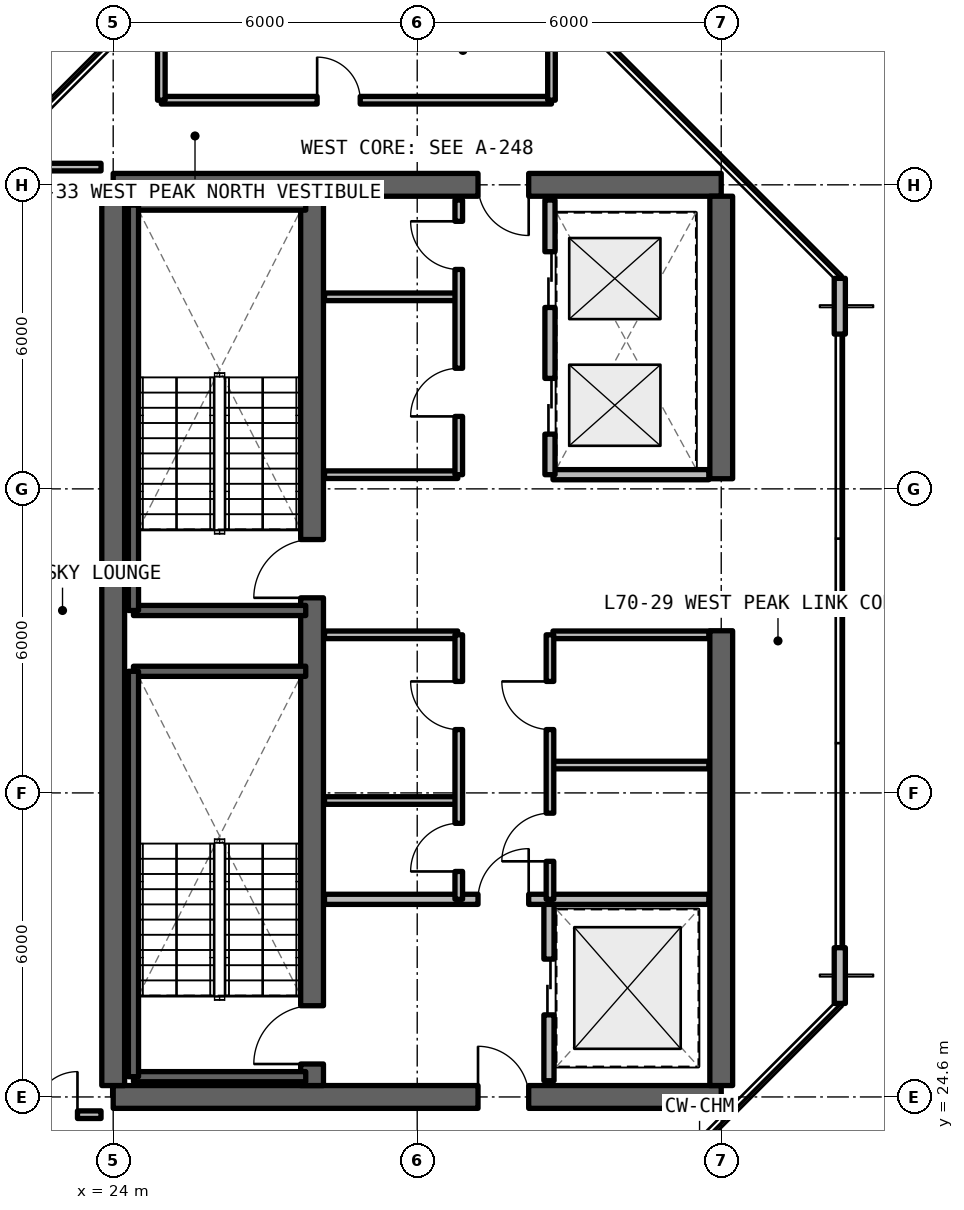
"""IFC4 building model, lengths in metres.
Left out: names, types, materials, properties, quantities, classifications, styles, units other than length and angle.
Written with IfcOpenShell. Run it as: python <this file> out.ifc"""

import sys

from ifc_helpers import new_model, si_unit, direction, frame, frame_2d, origin, place, context, subcontext, project, spatial, rectangle, extrude, element, fill, save


model = new_model("IFC4")
c1 = context("Model", 3, precision=1e-05, world=origin(), true_north=direction((0.0, 1.0)))
c2 = subcontext(c1, "Body", "Model", "MODEL_VIEW")
j1 = project(units=[si_unit("LENGTHUNIT", "METRE"), si_unit("PLANEANGLEUNIT", "RADIAN")], contexts=[c1])
p1 = place(None, origin())
s1 = spatial("IfcSite", under=j1, at=p1, CompositionType="ELEMENT")
p2 = place(p1, origin())
s2 = spatial("IfcBuilding", under=s1, at=p2, CompositionType="ELEMENT")
p3 = place(p2, frame((0.0, 0.0, 249.81)))
s3 = spatial("IfcBuildingStorey", under=s2, at=p3, CompositionType="ELEMENT", Elevation=249.81)
p4 = place(p3, frame((24.0, 24.6, 0.0), z_axis=(0.0, 0.0, 1.0), x_axis=(1.0, 0.0, 0.0)))
e1 = element("IfcWall", 1, at=p4, inside=s3, PredefinedType="SHEAR", context=c2, shape_type="SweptSolid", body=[
    extrude(rectangle(XDim=12.0, YDim=0.45, at=frame_2d((6.0, 0.0))), origin(), (0.0, 0.0, 1.0), 3.63),
])
p5 = place(p4, frame((7.2, 0.0, 0.0)))
e2 = element("IfcOpeningElement", 2, at=p5, cuts=e1, PredefinedType="OPENING", context=c2, shape_type="SweptSolid", body=[
    extrude(rectangle(XDim=1.0, YDim=2.15, at=frame_2d((0.5, 1.075))), frame((0.0, 0.235, 0.0), z_axis=(0.0, -1.0, 0.0), x_axis=(1.0, 0.0, 0.0)), (0.0, 0.0, 1.0), 0.47),
])
p6 = place(p3, frame((36.0, 42.6, 0.0), z_axis=(0.0, 0.0, 1.0), x_axis=(-1.0, 0.0, 0.0)))
e3 = element("IfcWall", 3, at=p6, inside=s3, PredefinedType="SHEAR", context=c2, shape_type="SweptSolid", body=[
    extrude(rectangle(XDim=12.0, YDim=0.45, at=frame_2d((6.0, 0.0))), origin(), (0.0, 0.0, 1.0), 3.63),
])
p7 = place(p6, frame((3.8, 0.0, 0.0)))
e4 = element("IfcOpeningElement", 4, at=p7, cuts=e3, PredefinedType="OPENING", context=c2, shape_type="SweptSolid", body=[
    extrude(rectangle(XDim=1.0, YDim=2.15, at=frame_2d((0.5, 1.075))), frame((0.0, 0.235, 0.0), z_axis=(0.0, -1.0, 0.0), x_axis=(1.0, 0.0, 0.0)), (0.0, 0.0, 1.0), 0.47),
])
p8 = place(p3, frame((24.0, 24.825, 0.0), z_axis=(0.0, 0.0, 1.0), x_axis=(0.0, 1.0, 0.0)))
e5 = element("IfcWall", 5, at=p8, inside=s3, PredefinedType="SHEAR", context=c2, shape_type="SweptSolid", body=[
    extrude(rectangle(XDim=17.55, YDim=0.45, at=frame_2d((8.775, 0.0))), origin(), (0.0, 0.0, 1.0), 3.63),
])
p9 = place(p3, frame((36.0, 24.825, 0.0), z_axis=(0.0, 0.0, 1.0), x_axis=(0.0, 1.0, 0.0)))
e6 = element("IfcWall", 6, at=p9, inside=s3, PredefinedType="SHEAR", context=c2, shape_type="SweptSolid", body=[
    extrude(rectangle(XDim=8.975, YDim=0.45, at=frame_2d((4.488, 0.0))), origin(), (0.0, 0.0, 1.0), 3.63),
])
p10 = place(p3, frame((36.0, 36.8, 0.0), z_axis=(0.0, 0.0, 1.0), x_axis=(0.0, 1.0, 0.0)))
e7 = element("IfcWall", 7, at=p10, inside=s3, PredefinedType="SHEAR", context=c2, shape_type="SweptSolid", body=[
    extrude(rectangle(XDim=5.575, YDim=0.45, at=frame_2d((2.788, 0.0))), origin(), (0.0, 0.0, 1.0), 3.63),
])
p11 = place(p3, frame((27.925, 24.825, 0.0), z_axis=(0.0, 0.0, 1.0), x_axis=(0.0, 1.0, 0.0)))
e8 = element("IfcWall", 8, at=p11, inside=s3, PredefinedType="SHEAR", context=c2, shape_type="SweptSolid", body=[
    extrude(rectangle(XDim=17.55, YDim=0.45, at=frame_2d((8.775, 0.0))), origin(), (0.0, 0.0, 1.0), 3.63),
])
p12 = place(p11, frame((0.425, 0.0, 0.0)))
e9 = element("IfcOpeningElement", 9, at=p12, cuts=e8, PredefinedType="OPENING", context=c2, shape_type="SweptSolid", body=[
    extrude(rectangle(XDim=1.15, YDim=2.15, at=frame_2d((0.575, 1.075))), frame((0.0, 0.235, 0.0), z_axis=(0.0, -1.0, 0.0), x_axis=(1.0, 0.0, 0.0)), (0.0, 0.0, 1.0), 0.47),
])
p13 = place(p11, frame((9.625, 0.0, 0.0)))
e10 = element("IfcOpeningElement", 10, at=p13, cuts=e8, PredefinedType="OPENING", context=c2, shape_type="SweptSolid", body=[
    extrude(rectangle(XDim=1.15, YDim=2.15, at=frame_2d((0.575, 1.075))), frame((0.0, 0.235, 0.0), z_axis=(0.0, -1.0, 0.0), x_axis=(1.0, 0.0, 0.0)), (0.0, 0.0, 1.0), 0.47),
])
for number, where, z_axis, x_axis in (
    (11, (38.34, 26.446, 0.0), (0.0, 0.0, 1.0), (0.0, 1.0, 0.0)),
    (12, (38.34, 39.654, 0.0), (0.0, 0.0, 1.0), (0.0, 1.0, 0.0)),
):
    element("IfcWall", number, at=place(p3, frame(where, z_axis=z_axis, x_axis=x_axis)), inside=s3, PredefinedType="SOLIDWALL", context=c2, shape_type="SweptSolid", body=[
        extrude(rectangle(XDim=1.1, YDim=0.22, at=frame_2d((0.55, 0.0))), origin(), (0.0, 0.0, 1.0), 3.41),
    ])
p14 = place(p3, frame((32.6, 24.92, 0.0), z_axis=(0.0, 0.0, 1.0), x_axis=(0.0, 1.0, 0.0)))
e13 = element("IfcWall", 13, at=p14, inside=s3, PredefinedType="SOLIDWALL", context=c2, shape_type="SweptSolid", body=[
    extrude(rectangle(XDim=3.58, YDim=0.2, at=frame_2d((1.79, 0.0))), origin(), (0.0, 0.0, 1.0), 2.63),
])
p15 = place(p14, frame((1.3, 0.0, 0.0)))
e14 = element("IfcOpeningElement", 14, at=p15, cuts=e13, PredefinedType="OPENING", context=c2, shape_type="SweptSolid", body=[
    extrude(rectangle(XDim=1.1, YDim=2.2, at=frame_2d((0.55, 1.1))), frame((0.0, 0.11, 0.0), z_axis=(0.0, -1.0, 0.0), x_axis=(1.0, 0.0, 0.0)), (0.0, 0.0, 1.0), 0.22),
])
p16 = place(p3, frame((28.17, 28.5, 0.0), z_axis=(0.0, 0.0, 1.0), x_axis=(1.0, 0.0, 0.0)))
e15 = element("IfcWall", 15, at=p16, inside=s3, PredefinedType="SOLIDWALL", context=c2, shape_type="SweptSolid", body=[
    extrude(rectangle(XDim=7.585, YDim=0.2, at=frame_2d((3.792, 0.0))), origin(), (0.0, 0.0, 1.0), 2.63),
])
p17 = place(p16, frame((3.03, 0.0, 0.0)))
e16 = element("IfcOpeningElement", 16, at=p17, cuts=e15, PredefinedType="OPENING", context=c2, shape_type="SweptSolid", body=[
    extrude(rectangle(XDim=1.0, YDim=2.15, at=frame_2d((0.5, 1.075))), frame((0.0, 0.11, 0.0), z_axis=(0.0, -1.0, 0.0), x_axis=(1.0, 0.0, 0.0)), (0.0, 0.0, 1.0), 0.22),
])
for number, where, z_axis, x_axis in (
    (17, (28.17, 30.45, 0.0), (0.0, 0.0, 1.0), (1.0, 0.0, 0.0)),
    (18, (28.17, 33.72, 0.0), (0.0, 0.0, 1.0), (1.0, 0.0, 0.0)),
):
    element("IfcWall", number, at=place(p3, frame(where, z_axis=z_axis, x_axis=x_axis)), inside=s3, PredefinedType="SOLIDWALL", context=c2, shape_type="SweptSolid", body=[
        extrude(rectangle(XDim=2.63, YDim=0.15, at=frame_2d((1.315, 0.0))), origin(), (0.0, 0.0, 1.0), 2.63),
    ])
p18 = place(p3, frame((30.82, 28.5, 0.0), z_axis=(0.0, 0.0, 1.0), x_axis=(0.0, 1.0, 0.0)))
e19 = element("IfcWall", 19, at=p18, inside=s3, PredefinedType="SOLIDWALL", context=c2, shape_type="SweptSolid", body=[
    extrude(rectangle(XDim=5.22, YDim=0.15, at=frame_2d((2.61, 0.0))), origin(), (0.0, 0.0, 1.0), 2.63),
])
p19 = place(p18, frame((0.55, 0.0, 0.0)))
e20 = element("IfcOpeningElement", 20, at=p19, cuts=e19, PredefinedType="OPENING", context=c2, shape_type="SweptSolid", body=[
    extrude(rectangle(XDim=0.95, YDim=2.15, at=frame_2d((0.475, 1.075))), frame((0.0, 0.085, 0.0), z_axis=(0.0, -1.0, 0.0), x_axis=(1.0, 0.0, 0.0)), (0.0, 0.0, 1.0), 0.17),
])
p20 = place(p18, frame((3.35, 0.0, 0.0)))
e21 = element("IfcOpeningElement", 21, at=p20, cuts=e19, PredefinedType="OPENING", context=c2, shape_type="SweptSolid", body=[
    extrude(rectangle(XDim=0.95, YDim=2.15, at=frame_2d((0.475, 1.075))), frame((0.0, 0.085, 0.0), z_axis=(0.0, -1.0, 0.0), x_axis=(1.0, 0.0, 0.0)), (0.0, 0.0, 1.0), 0.17),
])
for number, where, z_axis, x_axis in (
    (22, (32.68, 31.15, 0.0), (0.0, 0.0, 1.0), (1.0, 0.0, 0.0)),
    (23, (32.68, 33.72, 0.0), (0.0, 0.0, 1.0), (1.0, 0.0, 0.0)),
):
    element("IfcWall", number, at=place(p3, frame(where, z_axis=z_axis, x_axis=x_axis)), inside=s3, PredefinedType="SOLIDWALL", context=c2, shape_type="SweptSolid", body=[
        extrude(rectangle(XDim=3.075, YDim=0.15, at=frame_2d((1.538, 0.0))), origin(), (0.0, 0.0, 1.0), 2.63),
    ])
p21 = place(p3, frame((32.62, 28.5, 0.0), z_axis=(0.0, 0.0, 1.0), x_axis=(0.0, 1.0, 0.0)))
e24 = element("IfcWall", 24, at=p21, inside=s3, PredefinedType="SOLIDWALL", context=c2, shape_type="SweptSolid", body=[
    extrude(rectangle(XDim=5.22, YDim=0.15, at=frame_2d((2.61, 0.0))), origin(), (0.0, 0.0, 1.0), 2.63),
])
p22 = place(p21, frame((0.75, 0.0, 0.0)))
e25 = element("IfcOpeningElement", 25, at=p22, cuts=e24, PredefinedType="OPENING", context=c2, shape_type="SweptSolid", body=[
    extrude(rectangle(XDim=0.95, YDim=2.15, at=frame_2d((0.475, 1.075))), frame((0.0, 0.085, 0.0), z_axis=(0.0, -1.0, 0.0), x_axis=(1.0, 0.0, 0.0)), (0.0, 0.0, 1.0), 0.17),
])
p23 = place(p21, frame((3.35, 0.0, 0.0)))
e26 = element("IfcOpeningElement", 26, at=p23, cuts=e24, PredefinedType="OPENING", context=c2, shape_type="SweptSolid", body=[
    extrude(rectangle(XDim=0.95, YDim=2.15, at=frame_2d((0.475, 1.075))), frame((0.0, 0.085, 0.0), z_axis=(0.0, -1.0, 0.0), x_axis=(1.0, 0.0, 0.0)), (0.0, 0.0, 1.0), 0.17),
])
for number, where, z_axis, x_axis in (
    (27, (28.17, 36.88, 0.0), (0.0, 0.0, 1.0), (1.0, 0.0, 0.0)),
    (28, (28.17, 40.39, 0.0), (0.0, 0.0, 1.0), (1.0, 0.0, 0.0)),
):
    element("IfcWall", number, at=place(p3, frame(where, z_axis=z_axis, x_axis=x_axis)), inside=s3, PredefinedType="SOLIDWALL", context=c2, shape_type="SweptSolid", body=[
        extrude(rectangle(XDim=2.63, YDim=0.15, at=frame_2d((1.315, 0.0))), origin(), (0.0, 0.0, 1.0), 2.63),
    ])
p24 = place(p3, frame((30.82, 36.88, 0.0), z_axis=(0.0, 0.0, 1.0), x_axis=(0.0, 1.0, 0.0)))
e29 = element("IfcWall", 29, at=p24, inside=s3, PredefinedType="SOLIDWALL", context=c2, shape_type="SweptSolid", body=[
    extrude(rectangle(XDim=5.42, YDim=0.15, at=frame_2d((2.71, 0.0))), origin(), (0.0, 0.0, 1.0), 2.63),
])
p25 = place(p24, frame((1.15, 0.0, 0.0)))
e30 = element("IfcOpeningElement", 30, at=p25, cuts=e29, PredefinedType="OPENING", context=c2, shape_type="SweptSolid", body=[
    extrude(rectangle(XDim=0.95, YDim=2.15, at=frame_2d((0.475, 1.075))), frame((0.0, 0.085, 0.0), z_axis=(0.0, -1.0, 0.0), x_axis=(1.0, 0.0, 0.0)), (0.0, 0.0, 1.0), 0.17),
])
p26 = place(p24, frame((4.05, 0.0, 0.0)))
e31 = element("IfcOpeningElement", 31, at=p26, cuts=e29, PredefinedType="OPENING", context=c2, shape_type="SweptSolid", body=[
    extrude(rectangle(XDim=0.95, YDim=2.15, at=frame_2d((0.475, 1.075))), frame((0.0, 0.085, 0.0), z_axis=(0.0, -1.0, 0.0), x_axis=(1.0, 0.0, 0.0)), (0.0, 0.0, 1.0), 0.17),
])
p27 = place(p3, frame((32.68, 36.88, 0.0), z_axis=(0.0, 0.0, 1.0), x_axis=(1.0, 0.0, 0.0)))
e32 = element("IfcWall", 32, at=p27, inside=s3, PredefinedType="SOLIDWALL", context=c2, shape_type="SweptSolid", body=[
    extrude(rectangle(XDim=3.075, YDim=0.2, at=frame_2d((1.538, 0.0))), origin(), (0.0, 0.0, 1.0), 2.63),
])
p28 = place(p3, frame((32.62, 36.88, 0.0), z_axis=(0.0, 0.0, 1.0), x_axis=(0.0, 1.0, 0.0)))
e33 = element("IfcWall", 33, at=p28, inside=s3, PredefinedType="SOLIDWALL", context=c2, shape_type="SweptSolid", body=[
    extrude(rectangle(XDim=5.42, YDim=0.2, at=frame_2d((2.71, 0.0))), origin(), (0.0, 0.0, 1.0), 2.63),
])
p29 = place(p28, frame((0.8, 0.0, 0.0)))
e34 = element("IfcOpeningElement", 34, at=p29, cuts=e33, PredefinedType="OPENING", context=c2, shape_type="SweptSolid", body=[
    extrude(rectangle(XDim=1.1, YDim=2.2, at=frame_2d((0.55, 1.1))), frame((0.0, 0.11, 0.0), z_axis=(0.0, -1.0, 0.0), x_axis=(1.0, 0.0, 0.0)), (0.0, 0.0, 1.0), 0.22),
])
p30 = place(p28, frame((3.3, 0.0, 0.0)))
e35 = element("IfcOpeningElement", 35, at=p30, cuts=e33, PredefinedType="OPENING", context=c2, shape_type="SweptSolid", body=[
    extrude(rectangle(XDim=1.1, YDim=2.2, at=frame_2d((0.55, 1.1))), frame((0.0, 0.11, 0.0), z_axis=(0.0, -1.0, 0.0), x_axis=(1.0, 0.0, 0.0)), (0.0, 0.0, 1.0), 0.22),
])
p31 = place(p3, frame((22.12, 24.25, 0.0), z_axis=(0.0, 0.0, 1.0), x_axis=(1.0, 0.0, 0.0)))
e36 = element("IfcWall", 36, at=p31, inside=s3, PredefinedType="SOLIDWALL", context=c2, shape_type="SweptSolid", body=[
    extrude(rectangle(XDim=1.64, YDim=0.15, at=frame_2d((0.82, 0.0))), origin(), (0.0, 0.0, 1.0), 2.63),
])
p32 = place(p31, frame((0.325, 0.0, 0.0)))
e37 = element("IfcOpeningElement", 37, at=p32, cuts=e36, PredefinedType="OPENING", context=c2, shape_type="SweptSolid", body=[
    extrude(rectangle(XDim=0.85, YDim=2.1, at=frame_2d((0.425, 1.05))), frame((0.0, 0.085, 0.0), z_axis=(0.0, -1.0, 0.0), x_axis=(1.0, 0.0, 0.0)), (0.0, 0.0, 1.0), 0.17),
])
p33 = place(p3, frame((22.12, 42.95, 0.0), z_axis=(0.0, 0.0, 1.0), x_axis=(1.0, 0.0, 0.0)))
e38 = element("IfcWall", 38, at=p33, inside=s3, PredefinedType="SOLIDWALL", context=c2, shape_type="SweptSolid", body=[
    extrude(rectangle(XDim=1.64, YDim=0.15, at=frame_2d((0.82, 0.0))), origin(), (0.0, 0.0, 1.0), 2.63),
])
p34 = place(p3, frame((24.95, 44.27, 0.0), z_axis=(0.0, 0.0, 1.0), x_axis=(1.0, 0.0, 0.0)))
e39 = element("IfcWall", 39, at=p34, inside=s3, PredefinedType="SOLIDWALL", context=c2, shape_type="SweptSolid", body=[
    extrude(rectangle(XDim=7.7, YDim=0.15, at=frame_2d((3.85, 0.0))), origin(), (0.0, 0.0, 1.0), 2.63),
])
p35 = place(p34, frame((3.075, 0.0, 0.0)))
e40 = element("IfcOpeningElement", 40, at=p35, cuts=e39, PredefinedType="OPENING", context=c2, shape_type="SweptSolid", body=[
    extrude(rectangle(XDim=0.85, YDim=2.1, at=frame_2d((0.425, 1.05))), frame((0.0, 0.085, 0.0), z_axis=(0.0, -1.0, 0.0), x_axis=(1.0, 0.0, 0.0)), (0.0, 0.0, 1.0), 0.17),
])
for number, where, z_axis, x_axis in (
    (41, (24.95, 44.27, 0.0), (0.0, 0.0, 1.0), (0.0, 1.0, 0.0)),
    (42, (32.65, 44.27, 0.0), (0.0, 0.0, 1.0), (0.0, 1.0, 0.0)),
):
    element("IfcWall", number, at=place(p3, frame(where, z_axis=z_axis, x_axis=x_axis)), inside=s3, PredefinedType="SOLIDWALL", context=c2, shape_type="SweptSolid", body=[
        extrude(rectangle(XDim=2.01, YDim=0.15, at=frame_2d((1.005, 0.0))), origin(), (0.0, 0.0, 1.0), 2.63),
    ])
for number, where, z_axis, x_axis in (
    (43, (24.4, 25.0, 0.0), (0.0, 0.0, 1.0), (1.0, 0.0, 0.0)),
    (44, (27.8, 33.0, 0.0), (0.0, 0.0, 1.0), (-1.0, 0.0, 0.0)),
):
    element("IfcWall", number, at=place(p3, frame(where, z_axis=z_axis, x_axis=x_axis)), inside=s3, PredefinedType="SOLIDWALL", context=c2, shape_type="SweptSolid", body=[
        extrude(rectangle(XDim=3.4, YDim=0.2, at=frame_2d((1.7, 0.0))), origin(), (0.0, 0.0, 1.0), 3.63),
    ])
p36 = place(p3, frame((24.4, 33.0, 0.0), z_axis=(0.0, 0.0, 1.0), x_axis=(0.0, -1.0, 0.0)))
e45 = element("IfcWall", 45, at=p36, inside=s3, PredefinedType="SOLIDWALL", context=c2, shape_type="SweptSolid", body=[
    extrude(rectangle(XDim=8.0, YDim=0.2, at=frame_2d((4.0, 0.0))), origin(), (0.0, 0.0, 1.0), 3.63),
])
for number, where, z_axis, x_axis in (
    (46, (24.4, 34.2, 0.0), (0.0, 0.0, 1.0), (1.0, 0.0, 0.0)),
    (47, (27.8, 42.2, 0.0), (0.0, 0.0, 1.0), (-1.0, 0.0, 0.0)),
):
    element("IfcWall", number, at=place(p3, frame(where, z_axis=z_axis, x_axis=x_axis)), inside=s3, PredefinedType="SOLIDWALL", context=c2, shape_type="SweptSolid", body=[
        extrude(rectangle(XDim=3.4, YDim=0.2, at=frame_2d((1.7, 0.0))), origin(), (0.0, 0.0, 1.0), 3.63),
    ])
p37 = place(p3, frame((24.4, 42.2, 0.0), z_axis=(0.0, 0.0, 1.0), x_axis=(0.0, -1.0, 0.0)))
e48 = element("IfcWall", 48, at=p37, inside=s3, PredefinedType="SOLIDWALL", context=c2, shape_type="SweptSolid", body=[
    extrude(rectangle(XDim=8.0, YDim=0.2, at=frame_2d((4.0, 0.0))), origin(), (0.0, 0.0, 1.0), 3.63),
])
p38 = place(p15, origin())
e49 = element("IfcDoor", 49, at=p38, inside=s3, OperationType="SLIDING_TO_LEFT", PredefinedType="DOOR", context=c2, shape_type="SweptSolid", body=[
    extrude(rectangle(XDim=1.1, YDim=2.2, at=frame_2d((0.55, 1.1))), frame((0.0, 0.025, 0.0), z_axis=(0.0, -1.0, 0.0), x_axis=(1.0, 0.0, 0.0)), (0.0, 0.0, 1.0), 0.05),
])
fill(e14, e49)
p39 = place(p17, origin())
e50 = element("IfcDoor", 50, at=p39, inside=s3, OperationType="SINGLE_SWING_RIGHT", PredefinedType="DOOR", context=c2, shape_type="SweptSolid", body=[
    extrude(rectangle(XDim=1.0, YDim=2.15, at=frame_2d((0.5, 1.075))), frame((0.0, 0.025, 0.0), z_axis=(0.0, -1.0, 0.0), x_axis=(1.0, 0.0, 0.0)), (0.0, 0.0, 1.0), 0.05),
])
fill(e16, e50)
p40 = place(p19, origin())
e51 = element("IfcDoor", 51, at=p40, inside=s3, OperationType="SINGLE_SWING_LEFT", PredefinedType="DOOR", context=c2, shape_type="SweptSolid", body=[
    extrude(rectangle(XDim=0.95, YDim=2.15, at=frame_2d((0.475, 1.075))), frame((0.0, 0.025, 0.0), z_axis=(0.0, -1.0, 0.0), x_axis=(1.0, 0.0, 0.0)), (0.0, 0.0, 1.0), 0.05),
])
fill(e20, e51)
p41 = place(p20, origin())
e52 = element("IfcDoor", 52, at=p41, inside=s3, OperationType="SINGLE_SWING_RIGHT", PredefinedType="DOOR", context=c2, shape_type="SweptSolid", body=[
    extrude(rectangle(XDim=0.95, YDim=2.15, at=frame_2d((0.475, 1.075))), frame((0.0, 0.025, 0.0), z_axis=(0.0, -1.0, 0.0), x_axis=(1.0, 0.0, 0.0)), (0.0, 0.0, 1.0), 0.05),
])
fill(e21, e52)
p42 = place(p22, origin())
e53 = element("IfcDoor", 53, at=p42, inside=s3, OperationType="SINGLE_SWING_LEFT", PredefinedType="DOOR", context=c2, shape_type="SweptSolid", body=[
    extrude(rectangle(XDim=0.95, YDim=2.15, at=frame_2d((0.475, 1.075))), frame((0.0, 0.025, 0.0), z_axis=(0.0, -1.0, 0.0), x_axis=(1.0, 0.0, 0.0)), (0.0, 0.0, 1.0), 0.05),
])
fill(e25, e53)
p43 = place(p23, origin())
e54 = element("IfcDoor", 54, at=p43, inside=s3, OperationType="SINGLE_SWING_RIGHT", PredefinedType="DOOR", context=c2, shape_type="SweptSolid", body=[
    extrude(rectangle(XDim=0.95, YDim=2.15, at=frame_2d((0.475, 1.075))), frame((0.0, 0.025, 0.0), z_axis=(0.0, -1.0, 0.0), x_axis=(1.0, 0.0, 0.0)), (0.0, 0.0, 1.0), 0.05),
])
fill(e26, e54)
p44 = place(p25, origin())
e55 = element("IfcDoor", 55, at=p44, inside=s3, OperationType="SINGLE_SWING_LEFT", PredefinedType="DOOR", context=c2, shape_type="SweptSolid", body=[
    extrude(rectangle(XDim=0.95, YDim=2.15, at=frame_2d((0.475, 1.075))), frame((0.0, 0.025, 0.0), z_axis=(0.0, -1.0, 0.0), x_axis=(1.0, 0.0, 0.0)), (0.0, 0.0, 1.0), 0.05),
])
fill(e30, e55)
p45 = place(p26, origin())
e56 = element("IfcDoor", 56, at=p45, inside=s3, OperationType="SINGLE_SWING_RIGHT", PredefinedType="DOOR", context=c2, shape_type="SweptSolid", body=[
    extrude(rectangle(XDim=0.95, YDim=2.15, at=frame_2d((0.475, 1.075))), frame((0.0, 0.025, 0.0), z_axis=(0.0, -1.0, 0.0), x_axis=(1.0, 0.0, 0.0)), (0.0, 0.0, 1.0), 0.05),
])
fill(e31, e56)
p46 = place(p29, origin())
e57 = element("IfcDoor", 57, at=p46, inside=s3, OperationType="SLIDING_TO_LEFT", PredefinedType="DOOR", context=c2, shape_type="SweptSolid", body=[
    extrude(rectangle(XDim=1.1, YDim=2.2, at=frame_2d((0.55, 1.1))), frame((0.0, 0.025, 0.0), z_axis=(0.0, -1.0, 0.0), x_axis=(1.0, 0.0, 0.0)), (0.0, 0.0, 1.0), 0.05),
])
fill(e34, e57)
p47 = place(p30, origin())
e58 = element("IfcDoor", 58, at=p47, inside=s3, OperationType="SLIDING_TO_RIGHT", PredefinedType="DOOR", context=c2, shape_type="SweptSolid", body=[
    extrude(rectangle(XDim=1.1, YDim=2.2, at=frame_2d((0.55, 1.1))), frame((0.0, 0.025, 0.0), z_axis=(0.0, -1.0, 0.0), x_axis=(1.0, 0.0, 0.0)), (0.0, 0.0, 1.0), 0.05),
])
fill(e35, e58)
p48 = place(p32, origin())
e59 = element("IfcDoor", 59, at=p48, inside=s3, OperationType="SINGLE_SWING_RIGHT", PredefinedType="DOOR", context=c2, shape_type="SweptSolid", body=[
    extrude(rectangle(XDim=0.85, YDim=2.1, at=frame_2d((0.425, 1.05))), frame((0.0, 0.025, 0.0), z_axis=(0.0, -1.0, 0.0), x_axis=(1.0, 0.0, 0.0)), (0.0, 0.0, 1.0), 0.05),
])
fill(e37, e59)
p49 = place(p35, origin())
e60 = element("IfcDoor", 60, at=p49, inside=s3, OperationType="SINGLE_SWING_LEFT", PredefinedType="DOOR", context=c2, shape_type="SweptSolid", body=[
    extrude(rectangle(XDim=0.85, YDim=2.1, at=frame_2d((0.425, 1.05))), frame((0.0, 0.025, 0.0), z_axis=(0.0, -1.0, 0.0), x_axis=(1.0, 0.0, 0.0)), (0.0, 0.0, 1.0), 0.05),
])
fill(e40, e60)
p50 = place(p12, origin())
e61 = element("IfcDoor", 61, at=p50, inside=s3, OperationType="SINGLE_SWING_LEFT", PredefinedType="DOOR", context=c2, shape_type="SweptSolid", body=[
    extrude(rectangle(XDim=1.15, YDim=2.15, at=frame_2d((0.575, 1.075))), frame((0.0, 0.025, 0.0), z_axis=(0.0, -1.0, 0.0), x_axis=(1.0, 0.0, 0.0)), (0.0, 0.0, 1.0), 0.05),
])
fill(e9, e61)
p51 = place(p13, origin())
e62 = element("IfcDoor", 62, at=p51, inside=s3, OperationType="SINGLE_SWING_RIGHT", PredefinedType="DOOR", context=c2, shape_type="SweptSolid", body=[
    extrude(rectangle(XDim=1.15, YDim=2.15, at=frame_2d((0.575, 1.075))), frame((0.0, 0.025, 0.0), z_axis=(0.0, -1.0, 0.0), x_axis=(1.0, 0.0, 0.0)), (0.0, 0.0, 1.0), 0.05),
])
fill(e10, e62)
p52 = place(p5, origin())
e63 = element("IfcDoor", 63, at=p52, inside=s3, OperationType="SINGLE_SWING_LEFT", PredefinedType="DOOR", context=c2, shape_type="SweptSolid", body=[
    extrude(rectangle(XDim=1.0, YDim=2.15, at=frame_2d((0.5, 1.075))), frame((0.0, 0.025, 0.0), z_axis=(0.0, -1.0, 0.0), x_axis=(1.0, 0.0, 0.0)), (0.0, 0.0, 1.0), 0.05),
])
fill(e2, e63)
p53 = place(p7, origin())
e64 = element("IfcDoor", 64, at=p53, inside=s3, OperationType="SINGLE_SWING_RIGHT", PredefinedType="DOOR", context=c2, shape_type="SweptSolid", body=[
    extrude(rectangle(XDim=1.0, YDim=2.15, at=frame_2d((0.5, 1.075))), frame((0.0, 0.025, 0.0), z_axis=(0.0, -1.0, 0.0), x_axis=(1.0, 0.0, 0.0)), (0.0, 0.0, 1.0), 0.05),
])
fill(e4, e64)
save(model, sys.argv[1])
